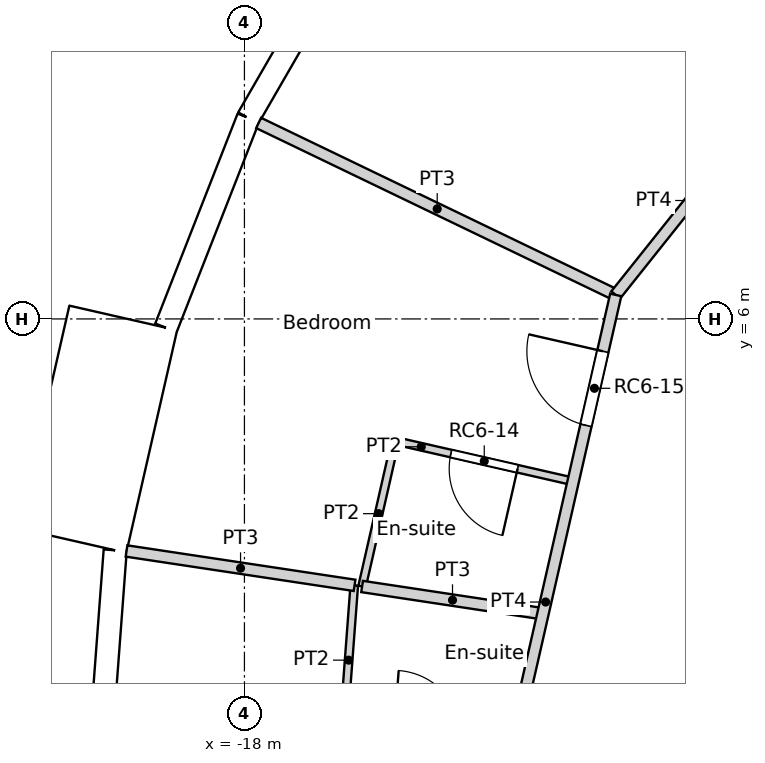
"""IFC4 building model, lengths in metres.
Left out: names, types, materials, properties, quantities, classifications, styles, units other than length and angle.
Written with IfcOpenShell. Run it as: python <this file> out.ifc"""

import sys

from ifc_helpers import new_model, si_unit, direction, frame, frame_2d, origin, origin_2d, place, context, subcontext, project, spatial, rectangle, circle, extrude, element, fill, save


model = new_model("IFC4")
c1 = context("Model", 3, precision=1e-05, world=origin(), true_north=direction((0.0, 1.0)))
c2 = subcontext(c1, "Body", "Model", "MODEL_VIEW")
j1 = project(units=[si_unit("LENGTHUNIT", "METRE"), si_unit("PLANEANGLEUNIT", "RADIAN")], contexts=[c1])
p1 = place(None, origin())
s1 = spatial("IfcSite", under=j1, at=p1, CompositionType="ELEMENT")
p2 = place(p1, origin())
s2 = spatial("IfcBuilding", under=s1, at=p2, CompositionType="ELEMENT")
p3 = place(p2, frame((0.0, 0.0, 283.8)))
s3 = spatial("IfcBuildingStorey", under=s2, at=p3, CompositionType="ELEMENT", Elevation=283.8)
for number, where, z_axis, x_axis in (
    (1, (-16.958, 8.167, 0.0), (0.0, 0.0, 1.0), (1.0, 0.0, 0.0)),
    (2, (-18.612, 2.805, 0.0), (0.0, 0.0, 1.0), (1.0, 0.0, 0.0)),
):
    element("IfcColumn", number, at=place(p3, frame(where, z_axis=z_axis, x_axis=x_axis)), inside=s3, PredefinedType="COLUMN", context=c2, shape_type="SweptSolid", body=[
        extrude(circle(Radius=0.45, at=origin_2d()), origin(), (0.0, 0.0, 1.0), 3.6),
    ])
p4 = place(p3, frame((-16.468, 11.209, 0.0), z_axis=(0.0, 0.0, 1.0), x_axis=(-0.500012570604, -0.866018146021, 0.0)))
e3 = element("IfcWall", 3, at=p4, inside=s3, PredefinedType="SOLIDWALL", context=c2, shape_type="SweptSolid", body=[
    extrude(rectangle(XDim=2.962, YDim=0.3, at=frame_2d((1.481, 0.0))), origin(), (0.0, 0.0, 1.0), 3.25),
])
p5 = place(p4, frame((1.481, 0.0, 1.55)))
e4 = element("IfcOpeningElement", 4, at=p5, cuts=e3, PredefinedType="OPENING", context=c2, shape_type="SweptSolid", body=[
    extrude(circle(Radius=0.9, at=origin_2d()), frame((0.0, 0.16, 0.0), z_axis=(0.0, -1.0, 0.0), x_axis=(1.0, 0.0, 0.0)), (0.0, 0.0, 1.0), 0.32),
])
p6 = place(p3, frame((-17.949, 8.644, 0.0), z_axis=(0.0, 0.0, 1.0), x_axis=(-0.365343821297, -0.930872650925, 0.0)))
e5 = element("IfcWall", 5, at=p6, inside=s3, PredefinedType="SOLIDWALL", context=c2, shape_type="SweptSolid", body=[
    extrude(rectangle(XDim=2.962, YDim=0.3, at=frame_2d((1.481, 0.0))), origin(), (0.0, 0.0, 1.0), 3.25),
])
p7 = place(p6, frame((1.481, 0.0, 1.55)))
e6 = element("IfcOpeningElement", 6, at=p7, cuts=e5, PredefinedType="OPENING", context=c2, shape_type="SweptSolid", body=[
    extrude(circle(Radius=0.9, at=origin_2d()), frame((0.0, 0.16, 0.0), z_axis=(0.0, -1.0, 0.0), x_axis=(1.0, 0.0, 0.0)), (0.0, 0.0, 1.0), 0.32),
])
p8 = place(p3, frame((-19.595, 6.011, -0.35), z_axis=(0.0, 0.0, 1.0), x_axis=(-0.222570682856, -0.974916555985, 0.0)))
e7 = element("IfcWall", 7, at=p8, inside=s3, PredefinedType="ELEMENTEDWALL", context=c2, shape_type="SweptSolid", body=[
    extrude(rectangle(XDim=3.0, YDim=1.45, at=frame_2d((1.5, 0.0))), origin(), (0.0, 0.0, 1.0), 3.6),
])
p9 = place(p8, frame((1.5, 0.0, 1.9)))
e8 = element("IfcOpeningElement", 8, at=p9, cuts=e7, PredefinedType="OPENING", context=c2, shape_type="SweptSolid", body=[
    extrude(circle(Radius=0.9, at=origin_2d()), frame((0.0, 0.735, 0.0), z_axis=(0.0, -1.0, 0.0), x_axis=(1.0, 0.0, 0.0)), (0.0, 0.0, 1.0), 1.47),
])
p10 = place(p3, frame((-19.7, 2.954, 0.0), z_axis=(0.0, 0.0, 1.0), x_axis=(-0.074755115547, -0.997201921729, 0.0)))
e9 = element("IfcWall", 9, at=p10, inside=s3, PredefinedType="SOLIDWALL", context=c2, shape_type="SweptSolid", body=[
    extrude(rectangle(XDim=2.962, YDim=0.3, at=frame_2d((1.481, 0.0))), origin(), (0.0, 0.0, 1.0), 3.25),
])
p11 = place(p10, frame((1.481, 0.0, 1.55)))
e10 = element("IfcOpeningElement", 10, at=p11, cuts=e9, PredefinedType="OPENING", context=c2, shape_type="SweptSolid", body=[
    extrude(circle(Radius=0.9, at=origin_2d()), frame((0.0, 0.16, 0.0), z_axis=(0.0, -1.0, 0.0), x_axis=(1.0, 0.0, 0.0)), (0.0, 0.0, 1.0), 0.32),
])
p12 = place(p3, frame((-13.115, 6.316, 0.0), z_axis=(0.0, 0.0, 1.0), x_axis=(0.623476099415, 0.781842409606, 0.0)))
e11 = element("IfcWall", 11, at=p12, inside=s3, PredefinedType="PARTITIONING", context=c2, shape_type="SweptSolid", body=[
    extrude(rectangle(XDim=3.177, YDim=0.15, at=frame_2d((1.589, 0.0))), origin(), (0.0, 0.0, 1.0), 3.25),
])
p13 = place(p3, frame((-14.557, 0.0, 0.0), z_axis=(0.0, 0.0, 1.0), x_axis=(0.222533159771, 0.974925121639, 0.0)))
e12 = element("IfcWall", 12, at=p13, inside=s3, PredefinedType="PARTITIONING", context=c2, shape_type="SweptSolid", body=[
    extrude(rectangle(XDim=6.478, YDim=0.15, at=frame_2d((3.239, 0.0))), origin(), (0.0, 0.0, 1.0), 3.25),
])
p14 = place(p13, frame((4.718, 0.0, 0.0)))
e13 = element("IfcOpeningElement", 13, at=p14, cuts=e12, PredefinedType="OPENING", context=c2, shape_type="SweptSolid", body=[
    extrude(rectangle(XDim=1.0, YDim=2.1, at=frame_2d((0.5, 1.05))), frame((0.0, 0.075, 0.0), z_axis=(0.0, -1.0, 0.0), x_axis=(1.0, 0.0, 0.0)), (0.0, 0.0, 1.0), 0.15),
])
p15 = place(p3, frame((-17.813, 8.578, 0.0), z_axis=(0.0, 0.0, 1.0), x_axis=(0.901004381064, -0.433809987557, 0.0)))
e14 = element("IfcWall", 14, at=p15, inside=s3, PredefinedType="PARTITIONING", context=c2, shape_type="SweptSolid", body=[
    extrude(rectangle(XDim=5.214, YDim=0.15, at=frame_2d((2.607, 0.0))), origin(), (0.0, 0.0, 1.0), 3.25),
])
p16 = place(p3, frame((-16.015, 4.396, 0.0), z_axis=(0.0, 0.0, 1.0), x_axis=(0.97493862442, -0.222473995368, 0.0)))
e15 = element("IfcWall", 15, at=p16, inside=s3, PredefinedType="PARTITIONING", context=c2, shape_type="SweptSolid", body=[
    extrude(rectangle(XDim=2.4, YDim=0.1, at=frame_2d((1.2, 0.0))), origin(), (0.0, 0.0, 1.0), 3.25),
])
p17 = place(p16, frame((0.75, 0.0, 0.0)))
e16 = element("IfcOpeningElement", 16, at=p17, cuts=e15, PredefinedType="OPENING", context=c2, shape_type="SweptSolid", body=[
    extrude(rectangle(XDim=0.9, YDim=2.04, at=frame_2d((0.45, 1.02))), frame((0.0, 0.05, 0.0), z_axis=(0.0, -1.0, 0.0), x_axis=(1.0, 0.0, 0.0)), (0.0, 0.0, 1.0), 0.1),
])
p18 = place(p3, frame((-16.452, 2.48, 0.0), z_axis=(0.0, 0.0, 1.0), x_axis=(0.22237276708, 0.974961718459, 0.0)))
e17 = element("IfcWall", 17, at=p18, inside=s3, PredefinedType="PARTITIONING", context=c2, shape_type="SweptSolid", body=[
    extrude(rectangle(XDim=1.965, YDim=0.1, at=frame_2d((0.983, 0.0))), origin(), (0.0, 0.0, 1.0), 3.25),
])
p19 = place(p3, frame((-19.551, 2.947, 0.0), z_axis=(0.0, 0.0, 1.0), x_axis=(0.988844081525, -0.14895429646, 0.0)))
e18 = element("IfcWall", 18, at=p19, inside=s3, PredefinedType="PARTITIONING", context=c2, shape_type="SweptSolid", body=[
    extrude(rectangle(XDim=3.034, YDim=0.15, at=frame_2d((1.517, 0.0))), origin(), (0.0, 0.0, 1.0), 3.25),
])
p20 = place(p3, frame((-16.452, 2.48, 0.0), z_axis=(0.0, 0.0, 1.0), x_axis=(0.988810951618, -0.149174065977, 0.0)))
e19 = element("IfcWall", 19, at=p20, inside=s3, PredefinedType="PARTITIONING", context=c2, shape_type="SweptSolid", body=[
    extrude(rectangle(XDim=2.406, YDim=0.15, at=frame_2d((1.203, 0.0))), origin(), (0.0, 0.0, 1.0), 3.25),
])
p21 = place(p3, frame((-16.703, 0.527, 0.0), z_axis=(0.0, 0.0, 1.0), x_axis=(0.07496524071, 0.99718614746, 0.0)))
e20 = element("IfcWall", 20, at=p21, inside=s3, PredefinedType="PARTITIONING", context=c2, shape_type="SweptSolid", body=[
    extrude(rectangle(XDim=1.974, YDim=0.1, at=frame_2d((0.987, 0.0))), origin(), (0.0, 0.0, 1.0), 3.25),
])
p22 = place(p5, origin())
e21 = element("IfcWindow", 21, at=p22, inside=s3, PartitioningType="SINGLE_PANEL", PredefinedType="WINDOW", context=c2, shape_type="SweptSolid", body=[
    extrude(circle(Radius=0.9, at=origin_2d()), frame((0.0, 0.12, 0.0), z_axis=(0.0, -1.0, 0.0), x_axis=(1.0, 0.0, 0.0)), (0.0, 0.0, 1.0), 0.1),
])
fill(e4, e21)
p23 = place(p7, origin())
e22 = element("IfcWindow", 22, at=p23, inside=s3, PartitioningType="SINGLE_PANEL", PredefinedType="WINDOW", context=c2, shape_type="SweptSolid", body=[
    extrude(circle(Radius=0.9, at=origin_2d()), frame((0.0, 0.12, 0.0), z_axis=(0.0, -1.0, 0.0), x_axis=(1.0, 0.0, 0.0)), (0.0, 0.0, 1.0), 0.1),
])
fill(e6, e22)
p24 = place(p9, origin())
e23 = element("IfcWindow", 23, at=p24, inside=s3, PartitioningType="SINGLE_PANEL", PredefinedType="WINDOW", context=c2, shape_type="SweptSolid", body=[
    extrude(circle(Radius=0.9, at=origin_2d()), frame((0.0, 0.695, 0.0), z_axis=(0.0, -1.0, 0.0), x_axis=(1.0, 0.0, 0.0)), (0.0, 0.0, 1.0), 0.1),
])
fill(e8, e23)
p25 = place(p11, origin())
e24 = element("IfcWindow", 24, at=p25, inside=s3, PartitioningType="SINGLE_PANEL", PredefinedType="WINDOW", context=c2, shape_type="SweptSolid", body=[
    extrude(circle(Radius=0.9, at=origin_2d()), frame((0.0, 0.12, 0.0), z_axis=(0.0, -1.0, 0.0), x_axis=(1.0, 0.0, 0.0)), (0.0, 0.0, 1.0), 0.1),
])
fill(e10, e24)
p26 = place(p17, origin())
e25 = element("IfcDoor", 25, at=p26, inside=s3, OperationType="SINGLE_SWING_LEFT", PredefinedType="DOOR", context=c2, shape_type="SweptSolid", body=[
    extrude(rectangle(XDim=0.9, YDim=2.04, at=frame_2d((0.45, 1.02))), frame((0.0, 0.025, 0.0), z_axis=(0.0, -1.0, 0.0), x_axis=(1.0, 0.0, 0.0)), (0.0, 0.0, 1.0), 0.05),
])
fill(e16, e25)
p27 = place(p14, origin())
e26 = element("IfcDoor", 26, at=p27, inside=s3, OperationType="SINGLE_SWING_RIGHT", PredefinedType="DOOR", context=c2, shape_type="SweptSolid", body=[
    extrude(rectangle(XDim=1.0, YDim=2.1, at=frame_2d((0.5, 1.05))), frame((0.0, 0.025, 0.0), z_axis=(0.0, -1.0, 0.0), x_axis=(1.0, 0.0, 0.0)), (0.0, 0.0, 1.0), 0.05),
])
fill(e13, e26)
save(model, sys.argv[1])
